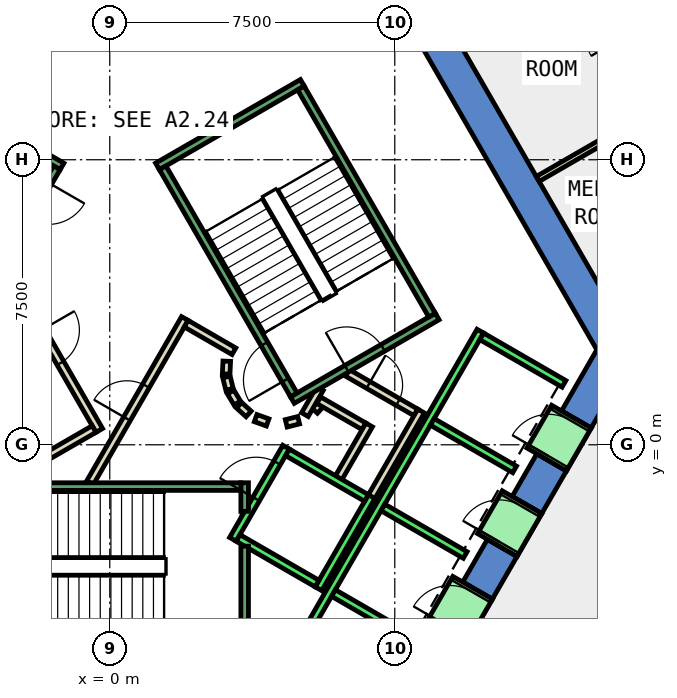
"""IFC4 building model, lengths in metres.
Left out: names, types, materials, properties, quantities, classifications, styles, units other than length and angle.
Written with IfcOpenShell. Run it as: python <this file> out.ifc"""

import sys

from ifc_helpers import new_model, si_unit, direction, frame, frame_2d, origin, place, context, subcontext, project, spatial, polyline, rectangle, outline, extrude, element, fill, save


model = new_model("IFC4")
c1 = context("Model", 3, precision=1e-05, world=origin(), true_north=direction((0.0, 1.0)))
c2 = subcontext(c1, "Body", "Model", "MODEL_VIEW")
j1 = project(units=[si_unit("LENGTHUNIT", "METRE"), si_unit("PLANEANGLEUNIT", "RADIAN")], contexts=[c1])
p1 = place(None, origin())
s1 = spatial("IfcSite", under=j1, at=p1, CompositionType="ELEMENT")
p2 = place(p1, origin())
s2 = spatial("IfcBuilding", under=s1, at=p2, CompositionType="ELEMENT")
p3 = place(p2, frame((0.0, 0.0, 120.2)))
s3 = spatial("IfcBuildingStorey", under=s2, at=p3, CompositionType="ELEMENT", Elevation=120.2)
p4 = place(p3, frame((0.0, 0.0, -0.4)))
e1 = element("IfcWall", 1, at=p4, inside=s3, PredefinedType="SHEAR", context=c2, shape_type="SweptSolid", body=[
    extrude(outline(polyline([(8.517, 11.748), (7.738, 11.298), (12.817, 2.5), (13.856, 2.5), (8.517, 11.748)])), origin(), (0.0, 0.0, 1.0), 4.2),
])
p5 = place(p3, frame((0.0, 0.0, -0.4)))
e2 = element("IfcWall", 2, at=p5, inside=s3, PredefinedType="SHEAR", context=c2, shape_type="SweptSolid", body=[
    extrude(outline(polyline([(10.717, -2.937), (9.938, -2.487), (9.288, -3.613), (10.067, -4.063), (10.717, -2.937)])), origin(), (0.0, 0.0, 1.0), 4.2),
])
p6 = place(p3, frame((0.0, 0.0, -0.4)))
e3 = element("IfcWall", 3, at=p6, inside=s3, PredefinedType="SHEAR", context=c2, shape_type="SweptSolid", body=[
    extrude(outline(polyline([(12.017, -0.686), (11.238, -0.236), (10.588, -1.361), (11.367, -1.811), (12.017, -0.686)])), origin(), (0.0, 0.0, 1.0), 4.2),
])
p7 = place(p3, frame((0.0, 0.0, -0.4)))
e4 = element("IfcWall", 4, at=p7, inside=s3, PredefinedType="SHEAR", context=c2, shape_type="SweptSolid", body=[
    extrude(outline(polyline([(11.888, 0.89), (12.667, 0.44), (13.856, 2.5), (12.817, 2.5), (11.888, 0.89)])), origin(), (0.0, 0.0, 1.0), 4.2),
])
p8 = place(p3, frame((0.0, 0.0, 3.6)))
e5 = element("IfcWall", 5, at=p8, inside=s3, PredefinedType="SHEAR", context=c2, shape_type="SweptSolid", body=[
    extrude(outline(polyline([(10.067, -4.063), (9.288, -3.613), (8.638, -4.739), (9.417, -5.189), (10.067, -4.063)])), origin(), (0.0, 0.0, 1.0), 0.2),
])
p9 = place(p3, frame((0.0, 0.0, 3.6)))
e6 = element("IfcWall", 6, at=p9, inside=s3, PredefinedType="SHEAR", context=c2, shape_type="SweptSolid", body=[
    extrude(outline(polyline([(11.367, -1.811), (10.588, -1.361), (9.938, -2.487), (10.717, -2.937), (11.367, -1.811)])), origin(), (0.0, 0.0, 1.0), 0.2),
])
p10 = place(p3, frame((0.0, 0.0, 3.6)))
e7 = element("IfcWall", 7, at=p10, inside=s3, PredefinedType="SHEAR", context=c2, shape_type="SweptSolid", body=[
    extrude(outline(polyline([(12.667, 0.44), (11.888, 0.89), (11.238, -0.236), (12.017, -0.686), (12.667, 0.44)])), origin(), (0.0, 0.0, 1.0), 0.2),
])
p11 = place(p3, frame((14.632, 8.853, 0.0), z_axis=(0.0, 0.0, 1.0), x_axis=(-0.504798859257, 0.863236996249, 0.0)))
e8 = element("IfcWall", 8, at=p11, inside=s3, PredefinedType="PARTITIONING", context=c2, shape_type="SweptSolid", body=[
    extrude(rectangle(XDim=5.365, YDim=0.2, at=frame_2d((2.682, 0.0))), origin(), (0.0, 0.0, 1.0), 3.8),
])
p12 = place(p11, frame((2.182, 0.0, 0.0)))
e9 = element("IfcOpeningElement", 9, at=p12, cuts=e8, PredefinedType="OPENING", context=c2, shape_type="SweptSolid", body=[
    extrude(rectangle(XDim=1.0, YDim=2.1, at=frame_2d((0.5, 1.05))), frame((0.0, 0.11, 0.0), z_axis=(0.0, -1.0, 0.0), x_axis=(1.0, 0.0, 0.0)), (0.0, 0.0, 1.0), 0.22),
])
p13 = place(p3, frame((5.39, 0.898, 0.0), z_axis=(0.0, 0.0, 1.0), x_axis=(0.673828488714, 0.738887791073, 0.0)))
e10 = element("IfcWall", 10, at=p13, inside=s3, PredefinedType="PARTITIONING", context=c2, shape_type="SweptSolid", body=[
    extrude(rectangle(XDim=0.263, YDim=0.2, at=frame_2d((0.131, 0.0))), origin(), (0.0, 0.0, 1.0), 3.8),
])
p14 = place(p3, frame((5.499, 1.172, 0.0), z_axis=(0.0, 0.0, 1.0), x_axis=(0.866333505267, -0.499465972466, 0.0)))
e11 = element("IfcWall", 11, at=p14, inside=s3, PredefinedType="PARTITIONING", context=c2, shape_type="SweptSolid", body=[
    extrude(rectangle(XDim=1.374, YDim=0.2, at=frame_2d((0.687, 0.0))), origin(), (0.0, 0.0, 1.0), 3.8),
])
p15 = place(p3, frame((6.826, 0.522, 0.0), z_axis=(0.0, 0.0, 1.0), x_axis=(-0.500016722714, -0.866015748706, 0.0)))
e12 = element("IfcWall", 12, at=p15, inside=s3, PredefinedType="PARTITIONING", context=c2, shape_type="SweptSolid", body=[
    extrude(rectangle(XDim=1.7, YDim=0.2, at=frame_2d((0.85, 0.0))), origin(), (0.0, 0.0, 1.0), 3.8),
])
p16 = place(p3, frame((6.25, 1.894, 0.0), z_axis=(0.0, 0.0, 1.0), x_axis=(0.866043184279, -0.499969202016, 0.0)))
e13 = element("IfcWall", 13, at=p16, inside=s3, PredefinedType="PARTITIONING", context=c2, shape_type="SweptSolid", body=[
    extrude(rectangle(XDim=2.084, YDim=0.2, at=frame_2d((1.042, 0.0))), origin(), (0.0, 0.0, 1.0), 3.8),
])
p17 = place(p16, frame((0.642, 0.0, 0.0)))
e14 = element("IfcOpeningElement", 14, at=p17, cuts=e13, PredefinedType="OPENING", context=c2, shape_type="SweptSolid", body=[
    extrude(rectangle(XDim=0.9, YDim=2.1, at=frame_2d((0.45, 1.05))), frame((0.0, 0.11, 0.0), z_axis=(0.0, -1.0, 0.0), x_axis=(1.0, 0.0, 0.0)), (0.0, 0.0, 1.0), 0.22),
])
p18 = place(p3, frame((8.192, 0.888, 0.0), z_axis=(0.0, 0.0, 1.0), x_axis=(-0.499940625693, -0.866059680843, 0.0)))
e15 = element("IfcWall", 15, at=p18, inside=s3, PredefinedType="PARTITIONING", context=c2, shape_type="SweptSolid", body=[
    extrude(rectangle(XDim=2.68, YDim=0.2, at=frame_2d((1.34, 0.0))), origin(), (0.0, 0.0, 1.0), 3.8),
])
p19 = place(p3, frame((5.135, 0.793, 0.0), z_axis=(0.0, 0.0, 1.0), x_axis=(0.499526442893, 0.866298639529, 0.0)))
e16 = element("IfcWall", 16, at=p19, inside=s3, PredefinedType="PARTITIONING", context=c2, shape_type="SweptSolid", body=[
    extrude(rectangle(XDim=0.791, YDim=0.2, at=frame_2d((0.396, 0.0))), origin(), (0.0, 0.0, 1.0), 3.8),
])
p20 = place(p3, frame((11.261, 6.994, 0.0), z_axis=(0.0, 0.0, 1.0), x_axis=(0.86605248387, 0.499953092981, 0.0)))
e17 = element("IfcWall", 17, at=p20, inside=s3, PredefinedType="PARTITIONING", context=c2, shape_type="SweptSolid", body=[
    extrude(rectangle(XDim=3.848, YDim=0.15, at=frame_2d((1.924, 0.0))), origin(), (0.0, 0.0, 1.0), 3.8),
])
p21 = place(p3, frame((-0.52, -1.0, 0.0), z_axis=(0.0, 0.0, 1.0), x_axis=(0.50011622646, 0.865958290007, 0.0)))
e18 = element("IfcWall", 18, at=p21, inside=s3, PredefinedType="PARTITIONING", context=c2, shape_type="SweptSolid", body=[
    extrude(rectangle(XDim=4.991, YDim=0.2, at=frame_2d((2.496, 0.0))), origin(), (0.0, 0.0, 1.0), 3.8),
])
p22 = place(p21, frame((1.945, 0.0, 0.0)))
e19 = element("IfcOpeningElement", 19, at=p22, cuts=e18, PredefinedType="OPENING", context=c2, shape_type="SweptSolid", body=[
    extrude(rectangle(XDim=1.0, YDim=2.1, at=frame_2d((0.5, 1.05))), frame((0.0, 0.11, 0.0), z_axis=(0.0, -1.0, 0.0), x_axis=(1.0, 0.0, 0.0)), (0.0, 0.0, 1.0), 0.22),
])
p23 = place(p3, frame((2.012, 3.186, 0.0), z_axis=(0.0, 0.0, 1.0), x_axis=(0.865891012941, -0.500232699559, 0.0)))
e20 = element("IfcWall", 20, at=p23, inside=s3, PredefinedType="PARTITIONING", context=c2, shape_type="SweptSolid", body=[
    extrude(rectangle(XDim=1.449, YDim=0.2, at=frame_2d((0.725, 0.0))), origin(), (0.0, 0.0, 1.0), 3.8),
])
p24 = place(p3, frame((3.079, 2.199, 0.0), z_axis=(0.0, 0.0, 1.0), x_axis=(-0.047771483479, -0.998858290933, 0.0)))
e21 = element("IfcWall", 21, at=p24, inside=s3, PredefinedType="PARTITIONING", context=c2, shape_type="SweptSolid", body=[
    extrude(rectangle(XDim=0.337, YDim=0.2, at=frame_2d((0.169, 0.0))), origin(), (0.0, 0.0, 1.0), 3.8),
])
p25 = place(p3, frame((3.07, 1.786, 0.0), z_axis=(0.0, 0.0, 1.0), x_axis=(0.242705583207, -0.970099994784, 0.0)))
e22 = element("IfcWall", 22, at=p25, inside=s3, PredefinedType="PARTITIONING", context=c2, shape_type="SweptSolid", body=[
    extrude(rectangle(XDim=0.338, YDim=0.2, at=frame_2d((0.169, 0.0))), origin(), (0.0, 0.0, 1.0), 3.8),
])
for number, where, z_axis, x_axis in (
    (23, (3.182, 1.388, 0.0), (0.0, 0.0, 1.0), (0.512, -0.859, 0.0)),
    (24, (3.404, 1.039, 0.0), (0.0, 0.0, 1.0), (0.74, -0.672, 0.0)),
):
    element("IfcWall", number, at=place(p3, frame(where, z_axis=z_axis, x_axis=x_axis)), inside=s3, PredefinedType="PARTITIONING", context=c2, shape_type="SweptSolid", body=[
        extrude(rectangle(XDim=0.338, YDim=0.2, at=frame_2d((0.169, 0.0))), origin(), (0.0, 0.0, 1.0), 3.8),
    ])
p26 = place(p3, frame((3.838, 0.702, 0.0), z_axis=(0.0, 0.0, 1.0), x_axis=(0.941035081519, -0.338308993895, 0.0)))
e25 = element("IfcWall", 25, at=p26, inside=s3, PredefinedType="PARTITIONING", context=c2, shape_type="SweptSolid", body=[
    extrude(rectangle(XDim=0.337, YDim=0.2, at=frame_2d((0.168, 0.0))), origin(), (0.0, 0.0, 1.0), 3.8),
])
p27 = place(p3, frame((4.644, 0.564, 0.0), z_axis=(0.0, 0.0, 1.0), x_axis=(0.969929076366, 0.243387729394, 0.0)))
e26 = element("IfcWall", 26, at=p27, inside=s3, PredefinedType="PARTITIONING", context=c2, shape_type="SweptSolid", body=[
    extrude(rectangle(XDim=0.337, YDim=0.2, at=frame_2d((0.168, 0.0))), origin(), (0.0, 0.0, 1.0), 3.8),
])
p28 = place(p3, frame((-2.771, 4.7, 0.0), z_axis=(0.0, 0.0, 1.0), x_axis=(0.499969479948, -0.866043023828, 0.0)))
e27 = element("IfcWall", 27, at=p28, inside=s3, PredefinedType="PARTITIONING", context=c2, shape_type="SweptSolid", body=[
    extrude(rectangle(XDim=4.99, YDim=0.2, at=frame_2d((2.495, 0.0))), origin(), (0.0, 0.0, 1.0), 3.8),
])
p29 = place(p28, frame((1.945, 0.0, 0.0)))
e28 = element("IfcOpeningElement", 28, at=p29, cuts=e27, PredefinedType="OPENING", context=c2, shape_type="SweptSolid", body=[
    extrude(rectangle(XDim=1.0, YDim=2.1, at=frame_2d((0.5, 1.05))), frame((0.0, 0.11, 0.0), z_axis=(0.0, -1.0, 0.0), x_axis=(1.0, 0.0, 0.0)), (0.0, 0.0, 1.0), 0.22),
])
p30 = place(p3, frame((-0.412, 0.414, 0.0), z_axis=(0.0, 0.0, 1.0), x_axis=(-0.866017369001, -0.500013916395, 0.0)))
e29 = element("IfcWall", 29, at=p30, inside=s3, PredefinedType="PARTITIONING", context=c2, shape_type="SweptSolid", body=[
    extrude(rectangle(XDim=1.45, YDim=0.2, at=frame_2d((0.725, 0.0))), origin(), (0.0, 0.0, 1.0), 3.8),
])
p31 = place(p3, frame((18.301, 2.598, 0.0), z_axis=(0.0, 0.0, 1.0), x_axis=(-0.49997732567, -0.866038494419, 0.0)))
e30 = element("IfcWall", 30, at=p31, inside=s3, PredefinedType="PARTITIONING", context=c2, shape_type="SweptSolid", body=[
    extrude(rectangle(XDim=11.0, YDim=0.2, at=frame_2d((5.5, 0.0))), origin(), (0.0, 0.0, 1.0), 3.8),
])
p32 = place(p3, frame((3.24, -2.488, 0.0), z_axis=(0.0, 0.0, 1.0), x_axis=(0.49994636267, 0.866056369097, 0.0)))
e31 = element("IfcWall", 31, at=p32, inside=s3, PredefinedType="STANDARD", context=c2, shape_type="SweptSolid", body=[
    extrude(rectangle(XDim=2.8, YDim=0.2, at=frame_2d((1.4, 0.0))), origin(), (0.0, 0.0, 1.0), 3.8),
])
p33 = place(p32, frame((1.225, 0.0, 0.0)))
e32 = element("IfcOpeningElement", 32, at=p33, cuts=e31, PredefinedType="OPENING", context=c2, shape_type="SweptSolid", body=[
    extrude(rectangle(XDim=1.1, YDim=2.1, at=frame_2d((0.55, 1.05))), frame((0.0, 0.11, 0.0), z_axis=(0.0, -1.0, 0.0), x_axis=(1.0, 0.0, 0.0)), (0.0, 0.0, 1.0), 0.22),
])
p34 = place(p3, frame((5.492, -3.788, 0.0), z_axis=(0.0, 0.0, 1.0), x_axis=(0.500011755427, 0.866018616679, 0.0)))
e33 = element("IfcWall", 33, at=p34, inside=s3, PredefinedType="STANDARD", context=c2, shape_type="SweptSolid", body=[
    extrude(rectangle(XDim=2.8, YDim=0.2, at=frame_2d((1.4, 0.0))), origin(), (0.0, 0.0, 1.0), 3.8),
])
p35 = place(p3, frame((3.377, -2.452, 0.0), z_axis=(0.0, 0.0, 1.0), x_axis=(0.865955154139, -0.50012165622, 0.0)))
e34 = element("IfcWall", 34, at=p35, inside=s3, PredefinedType="STANDARD", context=c2, shape_type="SweptSolid", body=[
    extrude(rectangle(XDim=2.4, YDim=0.2, at=frame_2d((1.2, 0.0))), origin(), (0.0, 0.0, 1.0), 3.8),
])
p36 = place(p3, frame((4.677, -0.2, 0.0), z_axis=(0.0, 0.0, 1.0), x_axis=(0.865973769406, -0.500089422704, 0.0)))
e35 = element("IfcWall", 35, at=p36, inside=s3, PredefinedType="STANDARD", context=c2, shape_type="SweptSolid", body=[
    extrude(rectangle(XDim=2.399, YDim=0.2, at=frame_2d((1.2, 0.0))), origin(), (0.0, 0.0, 1.0), 3.8),
])
p37 = place(p3, frame((4.451, -6.19, 0.0), z_axis=(0.0, 0.0, 1.0), x_axis=(0.50000090737, 0.866024879913, 0.0)))
e36 = element("IfcWall", 36, at=p37, inside=s3, PredefinedType="STANDARD", context=c2, shape_type="SweptSolid", body=[
    extrude(rectangle(XDim=10.6, YDim=0.2, at=frame_2d((5.3, 0.0))), origin(), (0.0, 0.0, 1.0), 3.8),
])
for number, where, z_axis, x_axis in (
    (37, (5.888, -3.902, 0.0), (0.0, 0.0, 1.0), (0.866, -0.5, 0.0)),
    (38, (7.188, -1.65, 0.0), (0.0, 0.0, 1.0), (0.866, -0.5, 0.0)),
    (39, (8.488, 0.602, 0.0), (0.0, 0.0, 1.0), (0.866, -0.5, 0.0)),
):
    element("IfcWall", number, at=place(p3, frame(where, z_axis=z_axis, x_axis=x_axis)), inside=s3, PredefinedType="STANDARD", context=c2, shape_type="SweptSolid", body=[
        extrude(rectangle(XDim=2.5, YDim=0.2, at=frame_2d((1.25, 0.0))), origin(), (0.0, 0.0, 1.0), 3.8),
    ])
p38 = place(p3, frame((9.788, 2.853, 0.0), z_axis=(0.0, 0.0, 1.0), x_axis=(0.865998541277, -0.500046524342, 0.0)))
e40 = element("IfcWall", 40, at=p38, inside=s3, PredefinedType="STANDARD", context=c2, shape_type="SweptSolid", body=[
    extrude(rectangle(XDim=2.5, YDim=0.2, at=frame_2d((1.25, 0.0))), origin(), (0.0, 0.0, 1.0), 3.8),
])
p39 = place(p3, frame((8.898, -4.889, 0.0), z_axis=(0.0, 0.0, 1.0), x_axis=(0.500036693733, 0.866004217611, 0.0)))
e41 = element("IfcWall", 41, at=p39, inside=s3, PredefinedType="STANDARD", context=c2, shape_type="SweptSolid", body=[
    extrude(rectangle(XDim=1.3, YDim=1.2, at=frame_2d((0.65, 0.0))), origin(), (0.0, 0.0, 1.0), 2.4),
])
p40 = place(p39, frame((0.1, 0.0, 0.0)))
e42 = element("IfcOpeningElement", 42, at=p40, cuts=e41, PredefinedType="OPENING", context=c2, shape_type="SweptSolid", body=[
    extrude(rectangle(XDim=1.1, YDim=2.3, at=frame_2d((0.55, 1.15))), frame((0.0, 0.61, 0.0), z_axis=(0.0, -1.0, 0.0), x_axis=(1.0, 0.0, 0.0)), (0.0, 0.0, 1.0), 1.22),
])
p41 = place(p3, frame((10.198, -2.637, 0.0), z_axis=(0.0, 0.0, 1.0), x_axis=(0.49989585183, 0.866085525409, 0.0)))
e43 = element("IfcWall", 43, at=p41, inside=s3, PredefinedType="STANDARD", context=c2, shape_type="SweptSolid", body=[
    extrude(rectangle(XDim=1.3, YDim=1.2, at=frame_2d((0.65, 0.0))), origin(), (0.0, 0.0, 1.0), 2.4),
])
p42 = place(p41, frame((0.1, 0.0, 0.0)))
e44 = element("IfcOpeningElement", 44, at=p42, cuts=e43, PredefinedType="OPENING", context=c2, shape_type="SweptSolid", body=[
    extrude(rectangle(XDim=1.1, YDim=2.3, at=frame_2d((0.55, 1.15))), frame((0.0, 0.61, 0.0), z_axis=(0.0, -1.0, 0.0), x_axis=(1.0, 0.0, 0.0)), (0.0, 0.0, 1.0), 1.22),
])
p43 = place(p3, frame((11.498, -0.385, 0.0), z_axis=(0.0, 0.0, 1.0), x_axis=(0.500221244143, 0.865897630733, 0.0)))
e45 = element("IfcWall", 45, at=p43, inside=s3, PredefinedType="STANDARD", context=c2, shape_type="SweptSolid", body=[
    extrude(rectangle(XDim=1.299, YDim=1.2, at=frame_2d((0.65, 0.0))), origin(), (0.0, 0.0, 1.0), 2.4),
])
p44 = place(p43, frame((0.1, 0.0, 0.0)))
e46 = element("IfcOpeningElement", 46, at=p44, cuts=e45, PredefinedType="OPENING", context=c2, shape_type="SweptSolid", body=[
    extrude(rectangle(XDim=1.1, YDim=2.3, at=frame_2d((0.55, 1.15))), frame((0.0, 0.61, 0.0), z_axis=(0.0, -1.0, 0.0), x_axis=(1.0, 0.0, 0.0)), (0.0, 0.0, 1.0), 1.22),
])
p45 = place(p3, frame((3.55, -2.667, 0.0), z_axis=(0.0, 0.0, 1.0), x_axis=(0.0, -1.0, 0.0)))
e47 = element("IfcWall", 47, at=p45, inside=s3, PredefinedType="STANDARD", context=c2, shape_type="SweptSolid", body=[
    extrude(rectangle(XDim=2.733, YDim=0.2, at=frame_2d((1.366, 0.0))), origin(), (0.0, 0.0, 1.0), 3.8),
])
p46 = place(p3, frame((3.55, -1.0, 0.0), z_axis=(0.0, 0.0, 1.0), x_axis=(0.0, -1.0, 0.0)))
e48 = element("IfcWall", 48, at=p46, inside=s3, PredefinedType="STANDARD", context=c2, shape_type="SweptSolid", body=[
    extrude(rectangle(XDim=0.751, YDim=0.2, at=frame_2d((0.375, 0.0))), origin(), (0.0, 0.0, 1.0), 3.8),
])
p47 = place(p3, frame((-3.45, -1.1, 0.0), z_axis=(0.0, 0.0, 1.0), x_axis=(1.0, 0.0, 0.0)))
e49 = element("IfcWall", 49, at=p47, inside=s3, PredefinedType="STANDARD", context=c2, shape_type="SweptSolid", body=[
    extrude(rectangle(XDim=6.9, YDim=0.2, at=frame_2d((3.45, 0.0))), origin(), (0.0, 0.0, 1.0), 3.8),
])
p48 = place(p47, frame((0.45, 0.0, 0.0)))
e50 = element("IfcOpeningElement", 50, at=p48, cuts=e49, PredefinedType="OPENING", context=c2, shape_type="SweptSolid", body=[
    extrude(rectangle(XDim=1.1, YDim=2.2, at=frame_2d((0.55, 1.1))), frame((0.0, 0.11, 0.0), z_axis=(0.0, -1.0, 0.0), x_axis=(1.0, 0.0, 0.0)), (0.0, 0.0, 1.0), 0.22),
])
p49 = place(p3, frame((4.806, 1.176, 0.0), z_axis=(0.0, 0.0, 1.0), x_axis=(0.866059941101, 0.499940174841, 0.0)))
e51 = element("IfcWall", 51, at=p49, inside=s3, PredefinedType="STANDARD", context=c2, shape_type="SweptSolid", body=[
    extrude(rectangle(XDim=4.4, YDim=0.2, at=frame_2d((2.2, 0.0))), origin(), (0.0, 0.0, 1.0), 3.8),
])
p50 = place(p49, frame((1.65, 0.0, 0.0)))
e52 = element("IfcOpeningElement", 52, at=p50, cuts=e51, PredefinedType="OPENING", context=c2, shape_type="SweptSolid", body=[
    extrude(rectangle(XDim=1.1, YDim=2.2, at=frame_2d((0.55, 1.1))), frame((0.0, 0.11, 0.0), z_axis=(0.0, -1.0, 0.0), x_axis=(1.0, 0.0, 0.0)), (0.0, 0.0, 1.0), 0.22),
])
p51 = place(p3, frame((1.256, 7.324, 0.0), z_axis=(0.0, 0.0, 1.0), x_axis=(0.866046073146, 0.499964197906, 0.0)))
e53 = element("IfcWall", 53, at=p51, inside=s3, PredefinedType="STANDARD", context=c2, shape_type="SweptSolid", body=[
    extrude(rectangle(XDim=4.4, YDim=0.2, at=frame_2d((2.2, 0.0))), origin(), (0.0, 0.0, 1.0), 3.8),
])
p52 = place(p3, frame((4.843, 1.312, 0.0), z_axis=(0.0, 0.0, 1.0), x_axis=(-0.499963383562, 0.866046543262, 0.0)))
e54 = element("IfcWall", 54, at=p52, inside=s3, PredefinedType="STANDARD", context=c2, shape_type="SweptSolid", body=[
    extrude(rectangle(XDim=6.9, YDim=0.2, at=frame_2d((3.45, 0.0))), origin(), (0.0, 0.0, 1.0), 3.8),
])
p53 = place(p52, frame((0.45, 0.0, 0.0)))
e55 = element("IfcOpeningElement", 55, at=p53, cuts=e54, PredefinedType="OPENING", context=c2, shape_type="SweptSolid", body=[
    extrude(rectangle(XDim=1.1, YDim=2.2, at=frame_2d((0.55, 1.1))), frame((0.0, 0.11, 0.0), z_axis=(0.0, -1.0, 0.0), x_axis=(1.0, 0.0, 0.0)), (0.0, 0.0, 1.0), 0.22),
])
p54 = place(p3, frame((8.48, 3.412, 0.0), z_axis=(0.0, 0.0, 1.0), x_axis=(-0.499978703459, 0.866037698999, 0.0)))
e56 = element("IfcWall", 56, at=p54, inside=s3, PredefinedType="STANDARD", context=c2, shape_type="SweptSolid", body=[
    extrude(rectangle(XDim=6.9, YDim=0.2, at=frame_2d((3.45, 0.0))), origin(), (0.0, 0.0, 1.0), 3.8),
])
p55 = place(p3, frame((-1.256, 7.324, 0.0), z_axis=(0.0, 0.0, 1.0), x_axis=(-0.866046073146, 0.499964197906, 0.0)))
e57 = element("IfcWall", 57, at=p55, inside=s3, PredefinedType="STANDARD", context=c2, shape_type="SweptSolid", body=[
    extrude(rectangle(XDim=4.4, YDim=0.2, at=frame_2d((2.2, 0.0))), origin(), (0.0, 0.0, 1.0), 3.8),
])
p56 = place(p55, frame((1.65, 0.0, 0.0)))
e58 = element("IfcOpeningElement", 58, at=p56, cuts=e57, PredefinedType="OPENING", context=c2, shape_type="SweptSolid", body=[
    extrude(rectangle(XDim=1.1, YDim=2.2, at=frame_2d((0.55, 1.1))), frame((0.0, 0.11, 0.0), z_axis=(0.0, -1.0, 0.0), x_axis=(1.0, 0.0, 0.0)), (0.0, 0.0, 1.0), 0.22),
])
p57 = place(p3, frame((-1.393, 7.288, 0.0), z_axis=(0.0, 0.0, 1.0), x_axis=(-0.499963383562, -0.866046543262, 0.0)))
e59 = element("IfcWall", 59, at=p57, inside=s3, PredefinedType="STANDARD", context=c2, shape_type="SweptSolid", body=[
    extrude(rectangle(XDim=6.9, YDim=0.2, at=frame_2d((3.45, 0.0))), origin(), (0.0, 0.0, 1.0), 3.8),
])
p58 = place(p57, frame((0.45, 0.0, 0.0)))
e60 = element("IfcOpeningElement", 60, at=p58, cuts=e59, PredefinedType="OPENING", context=c2, shape_type="SweptSolid", body=[
    extrude(rectangle(XDim=1.1, YDim=2.2, at=frame_2d((0.55, 1.1))), frame((0.0, 0.11, 0.0), z_axis=(0.0, -1.0, 0.0), x_axis=(1.0, 0.0, 0.0)), (0.0, 0.0, 1.0), 0.22),
])
p59 = place(p22, origin())
e61 = element("IfcDoor", 61, at=p59, inside=s3, OperationType="SINGLE_SWING_LEFT", PredefinedType="DOOR", context=c2, shape_type="SweptSolid", body=[
    extrude(rectangle(XDim=1.0, YDim=2.1, at=frame_2d((0.5, 1.05))), frame((0.0, 0.025, 0.0), z_axis=(0.0, -1.0, 0.0), x_axis=(1.0, 0.0, 0.0)), (0.0, 0.0, 1.0), 0.05),
])
fill(e19, e61)
p60 = place(p29, origin())
e62 = element("IfcDoor", 62, at=p60, inside=s3, OperationType="SINGLE_SWING_RIGHT", PredefinedType="DOOR", context=c2, shape_type="SweptSolid", body=[
    extrude(rectangle(XDim=1.0, YDim=2.1, at=frame_2d((0.5, 1.05))), frame((0.0, 0.025, 0.0), z_axis=(0.0, -1.0, 0.0), x_axis=(1.0, 0.0, 0.0)), (0.0, 0.0, 1.0), 0.05),
])
fill(e28, e62)
p61 = place(p17, origin())
e63 = element("IfcDoor", 63, at=p61, inside=s3, OperationType="SINGLE_SWING_LEFT", PredefinedType="DOOR", context=c2, shape_type="SweptSolid", body=[
    extrude(rectangle(XDim=0.9, YDim=2.1, at=frame_2d((0.45, 1.05))), frame((0.0, 0.025, 0.0), z_axis=(0.0, -1.0, 0.0), x_axis=(1.0, 0.0, 0.0)), (0.0, 0.0, 1.0), 0.05),
])
fill(e14, e63)
p62 = place(p40, origin())
e64 = element("IfcDoor", 64, at=p62, inside=s3, OperationType="SLIDING_TO_LEFT", PredefinedType="DOOR", context=c2, shape_type="SweptSolid", body=[
    extrude(rectangle(XDim=1.1, YDim=2.3, at=frame_2d((0.55, 1.15))), frame((0.0, 0.025, 0.0), z_axis=(0.0, -1.0, 0.0), x_axis=(1.0, 0.0, 0.0)), (0.0, 0.0, 1.0), 0.05),
])
fill(e42, e64)
p63 = place(p42, origin())
e65 = element("IfcDoor", 65, at=p63, inside=s3, OperationType="SLIDING_TO_LEFT", PredefinedType="DOOR", context=c2, shape_type="SweptSolid", body=[
    extrude(rectangle(XDim=1.1, YDim=2.3, at=frame_2d((0.55, 1.15))), frame((0.0, 0.025, 0.0), z_axis=(0.0, -1.0, 0.0), x_axis=(1.0, 0.0, 0.0)), (0.0, 0.0, 1.0), 0.05),
])
fill(e44, e65)
p64 = place(p44, origin())
e66 = element("IfcDoor", 66, at=p64, inside=s3, OperationType="SLIDING_TO_LEFT", PredefinedType="DOOR", context=c2, shape_type="SweptSolid", body=[
    extrude(rectangle(XDim=1.1, YDim=2.3, at=frame_2d((0.55, 1.15))), frame((0.0, 0.025, 0.0), z_axis=(0.0, -1.0, 0.0), x_axis=(1.0, 0.0, 0.0)), (0.0, 0.0, 1.0), 0.05),
])
fill(e46, e66)
p65 = place(p33, origin())
e67 = element("IfcDoor", 67, at=p65, inside=s3, OperationType="SLIDING_TO_LEFT", PredefinedType="DOOR", context=c2, shape_type="SweptSolid", body=[
    extrude(rectangle(XDim=1.1, YDim=2.1, at=frame_2d((0.55, 1.05))), frame((0.0, 0.025, 0.0), z_axis=(0.0, -1.0, 0.0), x_axis=(1.0, 0.0, 0.0)), (0.0, 0.0, 1.0), 0.05),
])
fill(e32, e67)
p66 = place(p53, origin())
e68 = element("IfcDoor", 68, at=p66, inside=s3, OperationType="SINGLE_SWING_LEFT", PredefinedType="DOOR", context=c2, shape_type="SweptSolid", body=[
    extrude(rectangle(XDim=1.1, YDim=2.2, at=frame_2d((0.55, 1.1))), frame((0.0, 0.025, 0.0), z_axis=(0.0, -1.0, 0.0), x_axis=(1.0, 0.0, 0.0)), (0.0, 0.0, 1.0), 0.05),
])
fill(e55, e68)
p67 = place(p50, origin())
e69 = element("IfcDoor", 69, at=p67, inside=s3, OperationType="SINGLE_SWING_LEFT", PredefinedType="DOOR", context=c2, shape_type="SweptSolid", body=[
    extrude(rectangle(XDim=1.1, YDim=2.2, at=frame_2d((0.55, 1.1))), frame((0.0, 0.025, 0.0), z_axis=(0.0, -1.0, 0.0), x_axis=(1.0, 0.0, 0.0)), (0.0, 0.0, 1.0), 0.05),
])
fill(e52, e69)
save(model, sys.argv[1])
